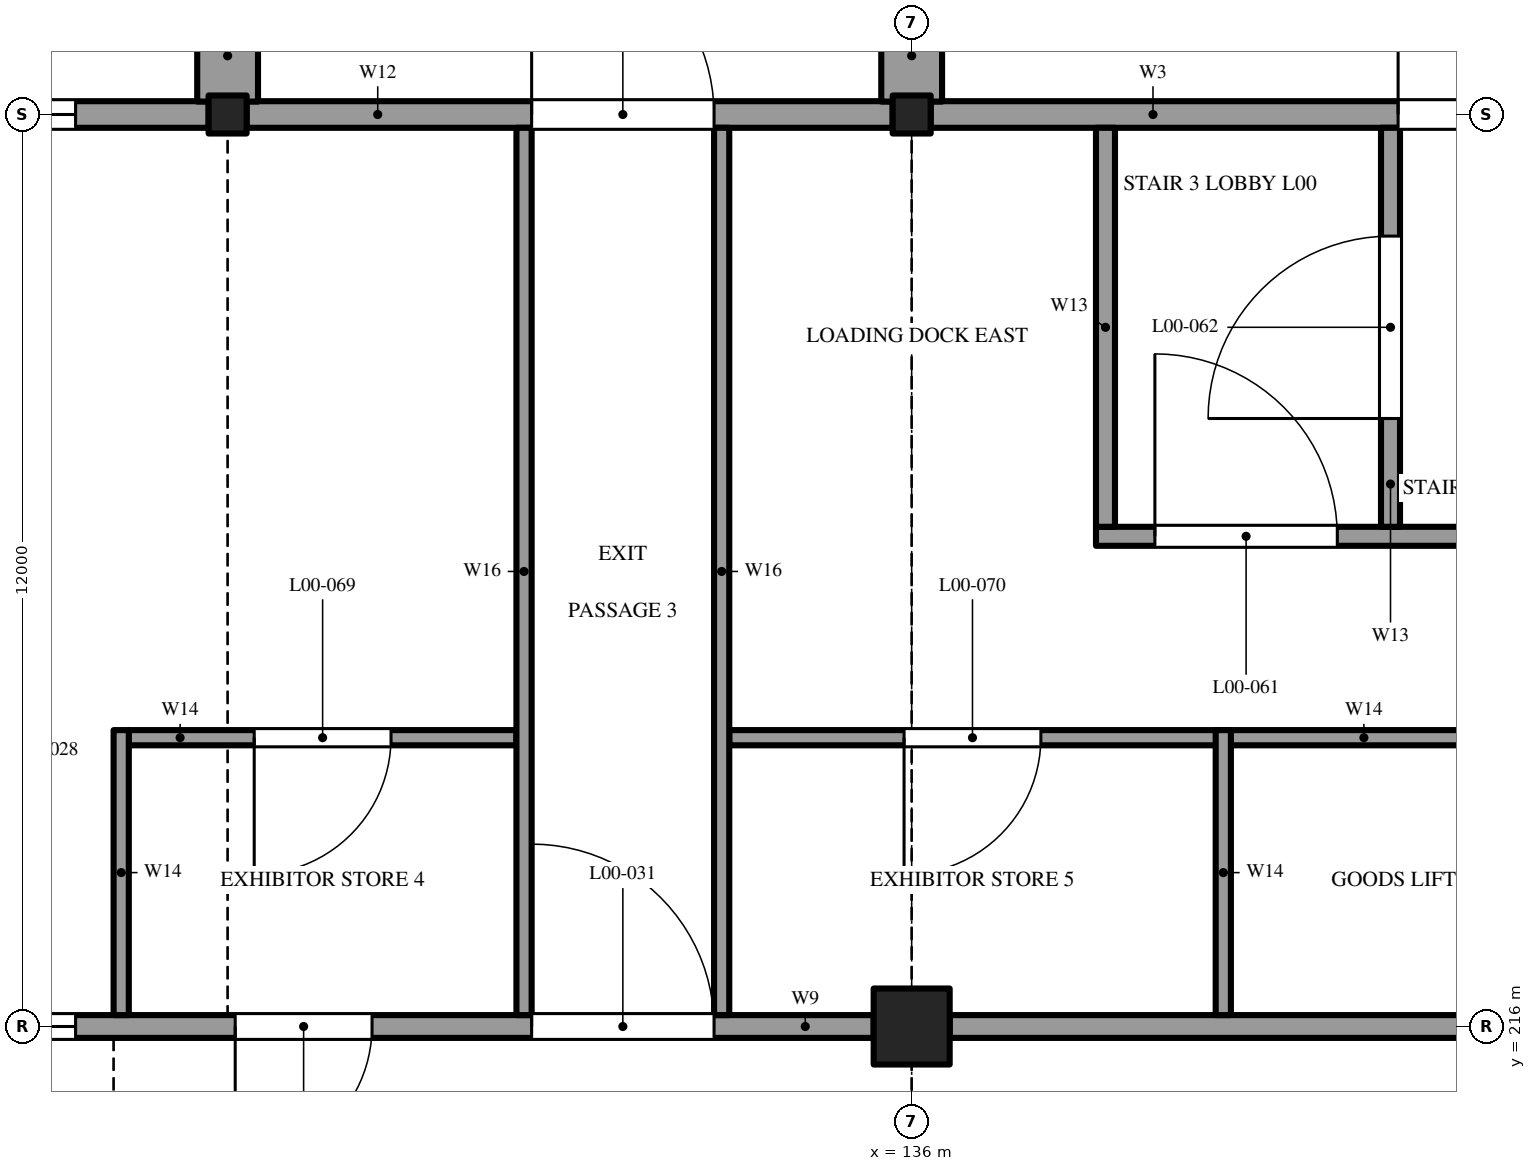
"""IFC4 building model, lengths in metres.
Left out: names, types, materials, properties, quantities, classifications, styles, units other than length and angle.
Written with IfcOpenShell. Run it as: python <this file> out.ifc"""

import sys

from ifc_helpers import new_model, si_unit, direction, frame, frame_2d, origin, origin_2d, place, context, subcontext, project, spatial, rectangle, extrude, element, fill, save


model = new_model("IFC4")
c1 = context("Model", 3, precision=1e-05, world=origin(), true_north=direction((0.0, 1.0)))
c2 = subcontext(c1, "Body", "Model", "MODEL_VIEW")
j1 = project(units=[si_unit("LENGTHUNIT", "METRE"), si_unit("PLANEANGLEUNIT", "RADIAN")], contexts=[c1])
p1 = place(None, origin())
s1 = spatial("IfcSite", under=j1, at=p1, CompositionType="ELEMENT")
p2 = place(p1, origin())
s2 = spatial("IfcBuilding", under=s1, at=p2, CompositionType="ELEMENT")
p3 = place(p2, origin())
s3 = spatial("IfcBuildingStorey", under=s2, at=p3, CompositionType="ELEMENT", Elevation=0.0)
p4 = place(p3, frame((136.0, 216.0, -0.4), z_axis=(0.0, 0.0, 1.0), x_axis=(1.0, 0.0, 0.0)))
e1 = element("IfcColumn", 1, at=p4, inside=s3, PredefinedType="COLUMN", context=c2, shape_type="SweptSolid", body=[
    extrude(rectangle(XDim=1.0, YDim=1.0, at=origin_2d()), origin(), (0.0, 0.0, 1.0), 7.6),
])
for number, where, z_axis, x_axis in (
    (2, (127.0, 228.0, -0.4), (0.0, 0.0, 1.0), (1.0, 0.0, 0.0)),
    (3, (136.0, 228.0, -0.4), (0.0, 0.0, 1.0), (1.0, 0.0, 0.0)),
):
    element("IfcColumn", number, at=place(p3, frame(where, z_axis=z_axis, x_axis=x_axis)), inside=s3, PredefinedType="COLUMN", context=c2, shape_type="SweptSolid", body=[
        extrude(rectangle(XDim=0.5, YDim=0.5, at=origin_2d()), origin(), (0.0, 0.0, 1.0), 7.6),
    ])
p5 = place(p3, frame((118.5, 216.0, 0.0), z_axis=(0.0, 0.0, 1.0), x_axis=(1.0, 0.0, 0.0)))
e4 = element("IfcWall", 4, at=p5, inside=s3, PredefinedType="SOLIDWALL", context=c2, shape_type="SweptSolid", body=[
    extrude(rectangle(XDim=17.0, YDim=0.3, at=frame_2d((8.5, 0.0))), origin(), (0.0, 0.0, 1.0), 6.8),
])
p6 = place(p5, frame((8.6, 0.0, 0.0)))
e5 = element("IfcOpeningElement", 5, at=p6, cuts=e4, PredefinedType="OPENING", context=c2, shape_type="SweptSolid", body=[
    extrude(rectangle(XDim=1.8, YDim=2.4, at=frame_2d((0.9, 1.2))), frame((0.0, 0.16, 0.0), z_axis=(0.0, -1.0, 0.0), x_axis=(1.0, 0.0, 0.0)), (0.0, 0.0, 1.0), 0.32),
])
p7 = place(p5, frame((1.5, 0.0, 0.0)))
e6 = element("IfcOpeningElement", 6, at=p7, cuts=e4, PredefinedType="OPENING", context=c2, shape_type="SweptSolid", body=[
    extrude(rectangle(XDim=5.0, YDim=5.5, at=frame_2d((2.5, 2.75))), frame((0.0, 0.16, 0.0), z_axis=(0.0, -1.0, 0.0), x_axis=(1.0, 0.0, 0.0)), (0.0, 0.0, 1.0), 0.32),
])
p8 = place(p5, frame((12.5, 0.0, 0.0)))
e7 = element("IfcOpeningElement", 7, at=p8, cuts=e4, PredefinedType="OPENING", context=c2, shape_type="SweptSolid", body=[
    extrude(rectangle(XDim=2.4, YDim=2.4, at=frame_2d((1.2, 1.2))), frame((0.0, 0.16, 0.0), z_axis=(0.0, -1.0, 0.0), x_axis=(1.0, 0.0, 0.0)), (0.0, 0.0, 1.0), 0.32),
])
p9 = place(p3, frame((136.5, 216.0, 0.0), z_axis=(0.0, 0.0, 1.0), x_axis=(1.0, 0.0, 0.0)))
e8 = element("IfcWall", 8, at=p9, inside=s3, PredefinedType="SOLIDWALL", context=c2, shape_type="SweptSolid", body=[
    extrude(rectangle(XDim=17.0, YDim=0.3, at=frame_2d((8.5, 0.0))), origin(), (0.0, 0.0, 1.0), 6.8),
])
p10 = place(p3, frame((118.25, 228.0, 0.0), z_axis=(0.0, 0.0, 1.0), x_axis=(1.0, 0.0, 0.0)))
e9 = element("IfcWall", 9, at=p10, inside=s3, PredefinedType="SOLIDWALL", context=c2, shape_type="SweptSolid", body=[
    extrude(rectangle(XDim=8.5, YDim=0.35, at=frame_2d((4.25, 0.0))), origin(), (0.0, 0.0, 1.0), 6.8),
])
p11 = place(p10, frame((1.75, 0.0, 0.0)))
e10 = element("IfcOpeningElement", 10, at=p11, cuts=e9, PredefinedType="OPENING", context=c2, shape_type="SweptSolid", body=[
    extrude(rectangle(XDim=5.0, YDim=5.5, at=frame_2d((2.5, 2.75))), frame((0.0, 0.185, 0.0), z_axis=(0.0, -1.0, 0.0), x_axis=(1.0, 0.0, 0.0)), (0.0, 0.0, 1.0), 0.37),
])
p12 = place(p3, frame((127.25, 228.0, 0.0), z_axis=(0.0, 0.0, 1.0), x_axis=(1.0, 0.0, 0.0)))
e11 = element("IfcWall", 11, at=p12, inside=s3, PredefinedType="SOLIDWALL", context=c2, shape_type="SweptSolid", body=[
    extrude(rectangle(XDim=8.5, YDim=0.35, at=frame_2d((4.25, 0.0))), origin(), (0.0, 0.0, 1.0), 6.8),
])
p13 = place(p12, frame((3.75, 0.0, 0.0)))
e12 = element("IfcOpeningElement", 12, at=p13, cuts=e11, PredefinedType="OPENING", context=c2, shape_type="SweptSolid", body=[
    extrude(rectangle(XDim=2.4, YDim=2.2, at=frame_2d((1.2, 1.1))), frame((0.0, 0.185, 0.0), z_axis=(0.0, -1.0, 0.0), x_axis=(1.0, 0.0, 0.0)), (0.0, 0.0, 1.0), 0.37),
])
p14 = place(p3, frame((136.25, 228.0, 0.0), z_axis=(0.0, 0.0, 1.0), x_axis=(1.0, 0.0, 0.0)))
e13 = element("IfcWall", 13, at=p14, inside=s3, PredefinedType="SOLIDWALL", context=c2, shape_type="SweptSolid", body=[
    extrude(rectangle(XDim=8.5, YDim=0.35, at=frame_2d((4.25, 0.0))), origin(), (0.0, 0.0, 1.0), 6.8),
])
p15 = place(p14, frame((6.15, 0.0, 0.0)))
e14 = element("IfcOpeningElement", 14, at=p15, cuts=e13, PredefinedType="OPENING", context=c2, shape_type="SweptSolid", body=[
    extrude(rectangle(XDim=2.2, YDim=2.2, at=frame_2d((1.1, 1.1))), frame((0.0, 0.185, 0.0), z_axis=(0.0, -1.0, 0.0), x_axis=(1.0, 0.0, 0.0)), (0.0, 0.0, 1.0), 0.37),
])
p16 = place(p3, frame((138.425, 222.45, 0.0), z_axis=(0.0, 0.0, 1.0), x_axis=(1.0, 0.0, 0.0)))
e15 = element("IfcWall", 15, at=p16, inside=s3, PredefinedType="SOLIDWALL", context=c2, shape_type="SweptSolid", body=[
    extrude(rectangle(XDim=15.4, YDim=0.25, at=frame_2d((7.7, 0.0))), origin(), (0.0, 0.0, 1.0), 6.8),
])
p17 = place(p16, frame((0.775, 0.0, 0.0)))
e16 = element("IfcOpeningElement", 16, at=p17, cuts=e15, PredefinedType="OPENING", context=c2, shape_type="SweptSolid", body=[
    extrude(rectangle(XDim=2.4, YDim=2.2, at=frame_2d((1.2, 1.1))), frame((0.0, 0.135, 0.0), z_axis=(0.0, -1.0, 0.0), x_axis=(1.0, 0.0, 0.0)), (0.0, 0.0, 1.0), 0.27),
])
p18 = place(p3, frame((142.3, 222.575, 0.0), z_axis=(0.0, 0.0, 1.0), x_axis=(0.0, 1.0, 0.0)))
e17 = element("IfcWall", 17, at=p18, inside=s3, PredefinedType="SOLIDWALL", context=c2, shape_type="SweptSolid", body=[
    extrude(rectangle(XDim=5.25, YDim=0.25, at=frame_2d((2.625, 0.0))), origin(), (0.0, 0.0, 1.0), 6.8),
])
p19 = place(p18, frame((1.425, 0.0, 0.0)))
e18 = element("IfcOpeningElement", 18, at=p19, cuts=e17, PredefinedType="OPENING", context=c2, shape_type="SweptSolid", body=[
    extrude(rectangle(XDim=2.4, YDim=2.2, at=frame_2d((1.2, 1.1))), frame((0.0, 0.135, 0.0), z_axis=(0.0, -1.0, 0.0), x_axis=(1.0, 0.0, 0.0)), (0.0, 0.0, 1.0), 0.27),
])
p20 = place(p3, frame((138.55, 222.575, 0.0), z_axis=(0.0, 0.0, 1.0), x_axis=(0.0, 1.0, 0.0)))
e19 = element("IfcWall", 19, at=p20, inside=s3, PredefinedType="SOLIDWALL", context=c2, shape_type="SweptSolid", body=[
    extrude(rectangle(XDim=5.25, YDim=0.25, at=frame_2d((2.625, 0.0))), origin(), (0.0, 0.0, 1.0), 6.8),
])
for number, where, z_axis, x_axis in (
    (20, (127.0, 228.17, -0.4), (0.0, 0.0, 1.0), (0.0, 1.0, 0.0)),
    (21, (136.0, 228.17, -0.4), (0.0, 0.0, 1.0), (0.0, 1.0, 0.0)),
):
    element("IfcWall", number, at=place(p3, frame(where, z_axis=z_axis, x_axis=x_axis)), inside=s3, PredefinedType="SOLIDWALL", context=c2, shape_type="SweptSolid", body=[
        extrude(rectangle(XDim=1.205, YDim=0.8, at=frame_2d((0.603, 0.0))), origin(), (0.0, 0.0, 1.0), 7.6),
    ])
p21 = place(p3, frame((125.7, 219.8, 0.0), z_axis=(0.0, 0.0, 1.0), x_axis=(1.0, 0.0, 0.0)))
e22 = element("IfcWall", 22, at=p21, inside=s3, PredefinedType="SOLIDWALL", context=c2, shape_type="SweptSolid", body=[
    extrude(rectangle(XDim=5.1, YDim=0.2, at=frame_2d((2.55, 0.0))), origin(), (0.0, 0.0, 1.0), 6.8),
])
p22 = place(p21, frame((1.65, 0.0, 0.0)))
e23 = element("IfcOpeningElement", 23, at=p22, cuts=e22, PredefinedType="OPENING", context=c2, shape_type="SweptSolid", body=[
    extrude(rectangle(XDim=1.8, YDim=2.4, at=frame_2d((0.9, 1.2))), frame((0.0, 0.11, 0.0), z_axis=(0.0, -1.0, 0.0), x_axis=(1.0, 0.0, 0.0)), (0.0, 0.0, 1.0), 0.22),
])
p23 = place(p3, frame((133.6, 219.8, 0.0), z_axis=(0.0, 0.0, 1.0), x_axis=(1.0, 0.0, 0.0)))
e24 = element("IfcWall", 24, at=p23, inside=s3, PredefinedType="SOLIDWALL", context=c2, shape_type="SweptSolid", body=[
    extrude(rectangle(XDim=17.575, YDim=0.2, at=frame_2d((8.788, 0.0))), origin(), (0.0, 0.0, 1.0), 6.8),
])
p24 = place(p23, frame((2.3, 0.0, 0.0)))
e25 = element("IfcOpeningElement", 25, at=p24, cuts=e24, PredefinedType="OPENING", context=c2, shape_type="SweptSolid", body=[
    extrude(rectangle(XDim=1.8, YDim=2.4, at=frame_2d((0.9, 1.2))), frame((0.0, 0.11, 0.0), z_axis=(0.0, -1.0, 0.0), x_axis=(1.0, 0.0, 0.0)), (0.0, 0.0, 1.0), 0.22),
])
p25 = place(p23, frame((12.7, 0.0, 0.0)))
e26 = element("IfcOpeningElement", 26, at=p25, cuts=e24, PredefinedType="OPENING", context=c2, shape_type="SweptSolid", body=[
    extrude(rectangle(XDim=1.2, YDim=2.1, at=frame_2d((0.6, 1.05))), frame((0.0, 0.11, 0.0), z_axis=(0.0, -1.0, 0.0), x_axis=(1.0, 0.0, 0.0)), (0.0, 0.0, 1.0), 0.22),
])
for number, where, z_axis, x_axis in (
    (27, (140.1, 216.15, 0.0), (0.0, 0.0, 1.0), (0.0, 1.0, 0.0)),
    (28, (125.6, 216.15, 0.0), (0.0, 0.0, 1.0), (0.0, 1.0, 0.0)),
):
    element("IfcWall", number, at=place(p3, frame(where, z_axis=z_axis, x_axis=x_axis)), inside=s3, PredefinedType="SOLIDWALL", context=c2, shape_type="SweptSolid", body=[
        extrude(rectangle(XDim=3.75, YDim=0.2, at=frame_2d((1.875, 0.0))), origin(), (0.0, 0.0, 1.0), 6.8),
    ])
for number, where, z_axis, x_axis in (
    (29, (130.9, 216.15, 0.0), (0.0, 0.0, 1.0), (0.0, 1.0, 0.0)),
    (30, (133.5, 216.15, 0.0), (0.0, 0.0, 1.0), (0.0, 1.0, 0.0)),
):
    element("IfcWall", number, at=place(p3, frame(where, z_axis=z_axis, x_axis=x_axis)), inside=s3, PredefinedType="SOLIDWALL", context=c2, shape_type="SweptSolid", body=[
        extrude(rectangle(XDim=11.675, YDim=0.2, at=frame_2d((5.837, 0.0))), origin(), (0.0, 0.0, 1.0), 6.8),
    ])
p26 = place(p6, frame((1.8, 0.0, 0.0), z_axis=(0.0, 0.0, 1.0), x_axis=(-1.0, 0.0, 0.0)))
e31 = element("IfcDoor", 31, at=p26, inside=s3, OperationType="DOUBLE_DOOR_SINGLE_SWING", PredefinedType="DOOR", context=c2, shape_type="SweptSolid", body=[
    extrude(rectangle(XDim=1.8, YDim=2.4, at=frame_2d((0.9, 1.2))), frame((0.0, 0.025, 0.0), z_axis=(0.0, -1.0, 0.0), x_axis=(1.0, 0.0, 0.0)), (0.0, 0.0, 1.0), 0.05),
])
fill(e5, e31)
p27 = place(p7, origin())
e32 = element("IfcDoor", 32, at=p27, inside=s3, OperationType="ROLLINGUP", PredefinedType="DOOR", context=c2, shape_type="SweptSolid", body=[
    extrude(rectangle(XDim=5.0, YDim=5.5, at=frame_2d((2.5, 2.75))), frame((0.0, 0.025, 0.0), z_axis=(0.0, -1.0, 0.0), x_axis=(1.0, 0.0, 0.0)), (0.0, 0.0, 1.0), 0.05),
])
fill(e6, e32)
p28 = place(p8, origin())
e33 = element("IfcDoor", 33, at=p28, inside=s3, OperationType="DOUBLE_DOOR_SINGLE_SWING", PredefinedType="DOOR", context=c2, shape_type="SweptSolid", body=[
    extrude(rectangle(XDim=2.4, YDim=2.4, at=frame_2d((1.2, 1.2))), frame((0.0, 0.025, 0.0), z_axis=(0.0, -1.0, 0.0), x_axis=(1.0, 0.0, 0.0)), (0.0, 0.0, 1.0), 0.05),
])
fill(e7, e33)
p29 = place(p11, origin())
e34 = element("IfcDoor", 34, at=p29, inside=s3, OperationType="ROLLINGUP", PredefinedType="DOOR", context=c2, shape_type="SweptSolid", body=[
    extrude(rectangle(XDim=5.0, YDim=5.5, at=frame_2d((2.5, 2.75))), frame((0.0, 0.025, 0.0), z_axis=(0.0, -1.0, 0.0), x_axis=(1.0, 0.0, 0.0)), (0.0, 0.0, 1.0), 0.05),
])
fill(e10, e34)
p30 = place(p15, origin())
e35 = element("IfcDoor", 35, at=p30, inside=s3, OperationType="DOUBLE_DOOR_SINGLE_SWING", PredefinedType="DOOR", context=c2, shape_type="SweptSolid", body=[
    extrude(rectangle(XDim=2.2, YDim=2.2, at=frame_2d((1.1, 1.1))), frame((0.0, 0.025, 0.0), z_axis=(0.0, -1.0, 0.0), x_axis=(1.0, 0.0, 0.0)), (0.0, 0.0, 1.0), 0.05),
])
fill(e14, e35)
p31 = place(p13, origin())
e36 = element("IfcDoor", 36, at=p31, inside=s3, OperationType="DOUBLE_DOOR_SINGLE_SWING", PredefinedType="DOOR", context=c2, shape_type="SweptSolid", body=[
    extrude(rectangle(XDim=2.4, YDim=2.2, at=frame_2d((1.2, 1.1))), frame((0.0, 0.025, 0.0), z_axis=(0.0, -1.0, 0.0), x_axis=(1.0, 0.0, 0.0)), (0.0, 0.0, 1.0), 0.05),
])
fill(e12, e36)
p32 = place(p17, origin())
e37 = element("IfcDoor", 37, at=p32, inside=s3, OperationType="DOUBLE_DOOR_SINGLE_SWING", PredefinedType="DOOR", context=c2, shape_type="SweptSolid", body=[
    extrude(rectangle(XDim=2.4, YDim=2.2, at=frame_2d((1.2, 1.1))), frame((0.0, 0.025, 0.0), z_axis=(0.0, -1.0, 0.0), x_axis=(1.0, 0.0, 0.0)), (0.0, 0.0, 1.0), 0.05),
])
fill(e16, e37)
p33 = place(p19, origin())
e38 = element("IfcDoor", 38, at=p33, inside=s3, OperationType="DOUBLE_DOOR_SINGLE_SWING", PredefinedType="DOOR", context=c2, shape_type="SweptSolid", body=[
    extrude(rectangle(XDim=2.4, YDim=2.2, at=frame_2d((1.2, 1.1))), frame((0.0, 0.025, 0.0), z_axis=(0.0, -1.0, 0.0), x_axis=(1.0, 0.0, 0.0)), (0.0, 0.0, 1.0), 0.05),
])
fill(e18, e38)
p34 = place(p22, frame((1.8, 0.0, 0.0), z_axis=(0.0, 0.0, 1.0), x_axis=(-1.0, 0.0, 0.0)))
e39 = element("IfcDoor", 39, at=p34, inside=s3, OperationType="DOUBLE_DOOR_SINGLE_SWING", PredefinedType="DOOR", context=c2, shape_type="SweptSolid", body=[
    extrude(rectangle(XDim=1.8, YDim=2.4, at=frame_2d((0.9, 1.2))), frame((0.0, 0.025, 0.0), z_axis=(0.0, -1.0, 0.0), x_axis=(1.0, 0.0, 0.0)), (0.0, 0.0, 1.0), 0.05),
])
fill(e23, e39)
p35 = place(p24, frame((1.8, 0.0, 0.0), z_axis=(0.0, 0.0, 1.0), x_axis=(-1.0, 0.0, 0.0)))
e40 = element("IfcDoor", 40, at=p35, inside=s3, OperationType="DOUBLE_DOOR_SINGLE_SWING", PredefinedType="DOOR", context=c2, shape_type="SweptSolid", body=[
    extrude(rectangle(XDim=1.8, YDim=2.4, at=frame_2d((0.9, 1.2))), frame((0.0, 0.025, 0.0), z_axis=(0.0, -1.0, 0.0), x_axis=(1.0, 0.0, 0.0)), (0.0, 0.0, 1.0), 0.05),
])
fill(e25, e40)
save(model, sys.argv[1])
